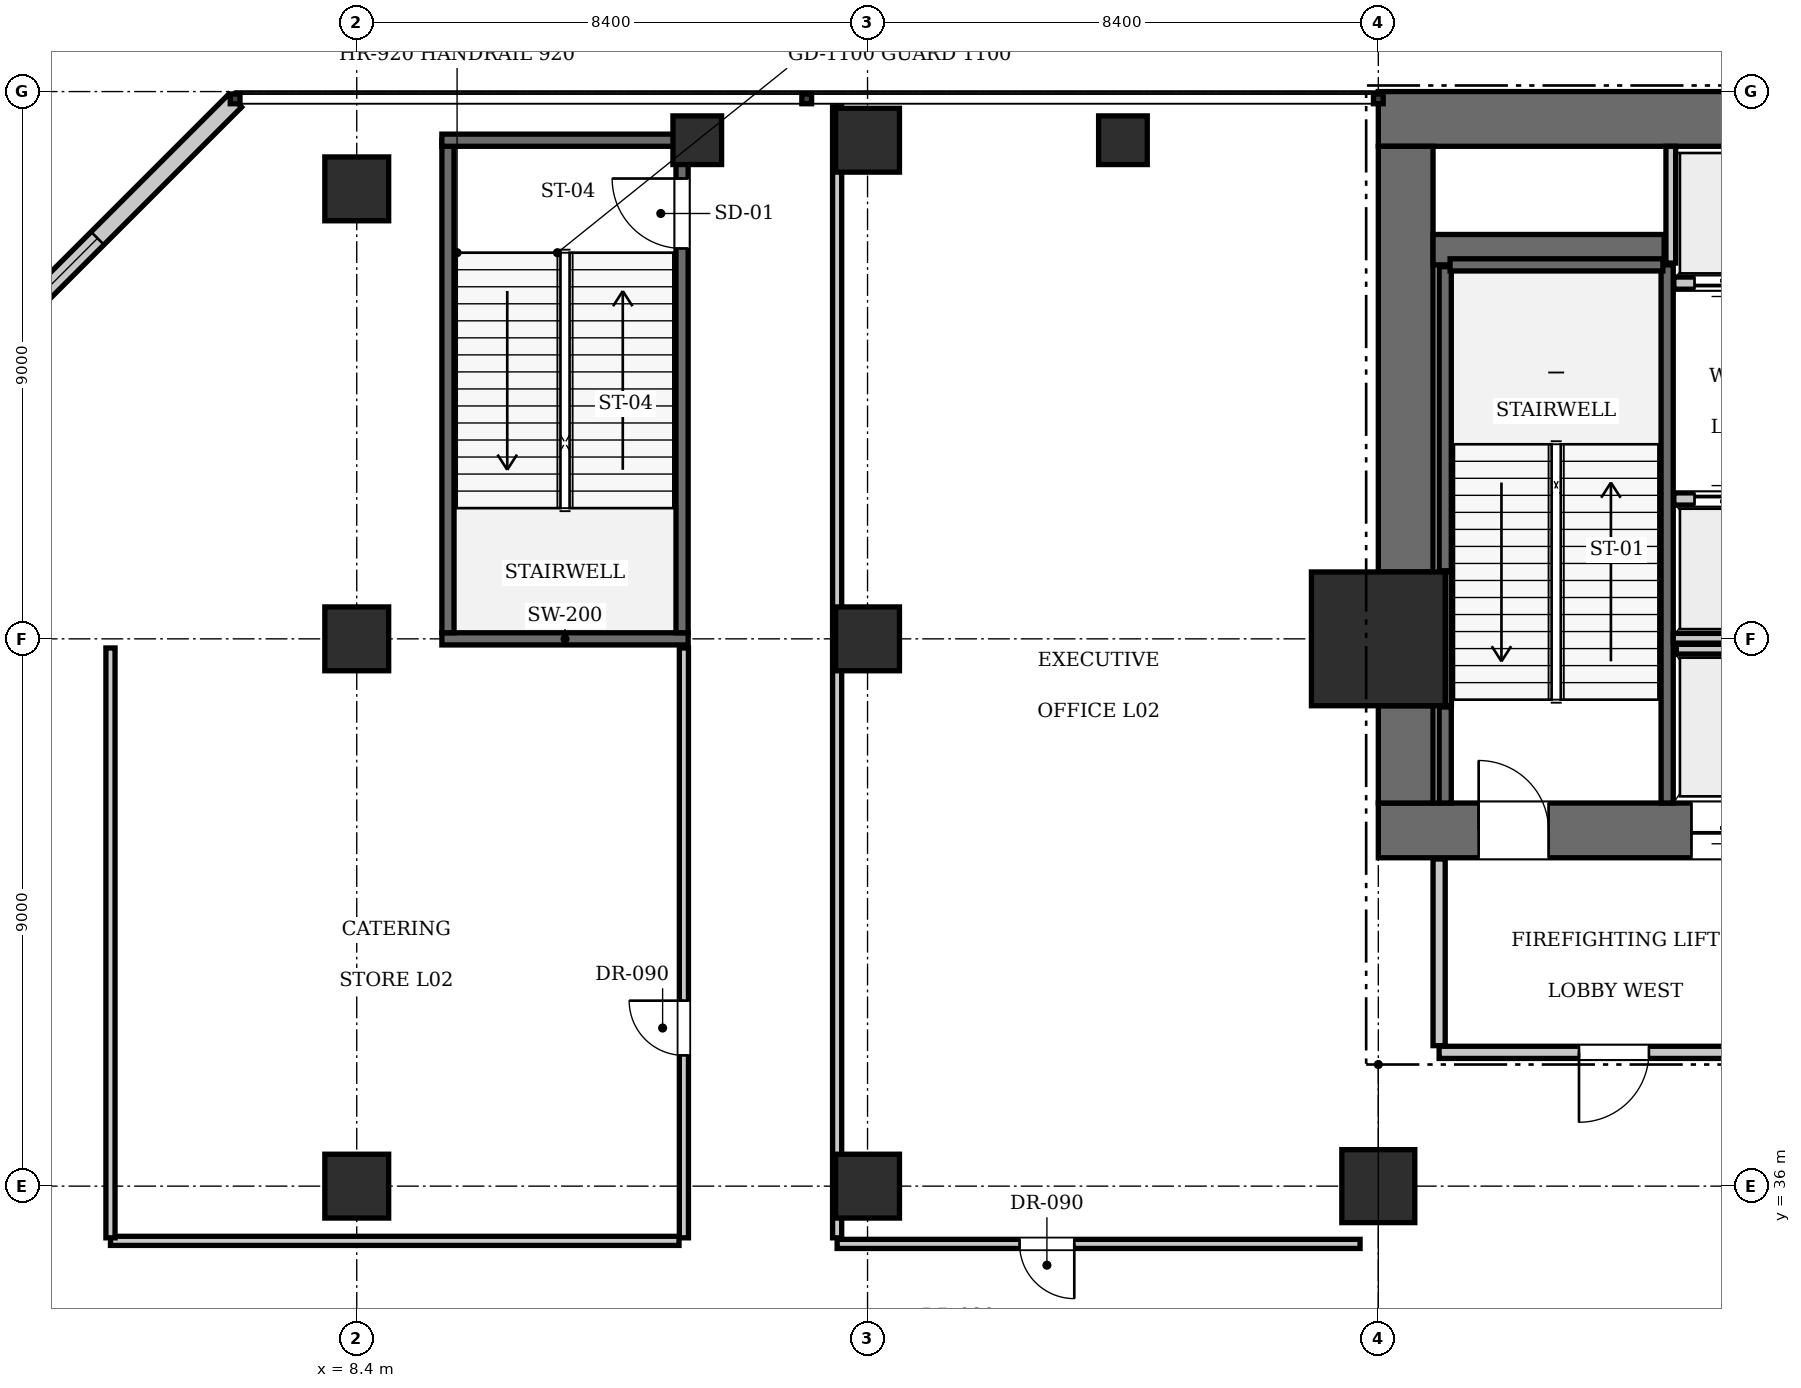
"""IFC4 building model, lengths in metres.
Left out: names, types, materials, properties, quantities, classifications, styles, units other than length and angle.
Written with IfcOpenShell. Run it as: python <this file> out.ifc"""

import sys

from ifc_helpers import new_model, si_unit, direction, frame, frame_2d, origin, origin_2d, place, context, subcontext, project, spatial, rectangle, extrude, element, fill, save


model = new_model("IFC4")
c1 = context("Model", 3, precision=1e-05, world=origin(), true_north=direction((0.0, 1.0)))
c2 = subcontext(c1, "Body", "Model", "MODEL_VIEW")
j1 = project(units=[si_unit("LENGTHUNIT", "METRE"), si_unit("PLANEANGLEUNIT", "RADIAN")], contexts=[c1])
p1 = place(None, origin())
s1 = spatial("IfcSite", under=j1, at=p1, CompositionType="ELEMENT")
p2 = place(p1, origin())
s2 = spatial("IfcBuilding", under=s1, at=p2, CompositionType="ELEMENT")
p3 = place(p2, frame((0.0, 0.0, 10.85)))
s3 = spatial("IfcBuildingStorey", under=s2, at=p3, CompositionType="ELEMENT", Elevation=10.85)
p4 = place(p3, frame((25.2, 45.0, 0.0), z_axis=(0.0, 0.0, 1.0), x_axis=(1.0, 0.0, 0.0)))
e1 = element("IfcColumn", 1, at=p4, inside=s3, PredefinedType="COLUMN", context=c2, shape_type="SweptSolid", body=[
    extrude(rectangle(XDim=2.2, YDim=2.2, at=origin_2d()), origin(), (0.0, 0.0, 1.0), 5.6),
])
p5 = place(p3, frame((25.2, 53.55, 0.0), z_axis=(0.0, 0.0, 1.0), x_axis=(1.0, 0.0, 0.0)))
e2 = element("IfcWall", 2, at=p5, inside=s3, PredefinedType="SHEAR", context=c2, shape_type="SweptSolid", body=[
    extrude(rectangle(XDim=25.2, YDim=0.9, at=frame_2d((12.6, 0.0))), origin(), (0.0, 0.0, 1.0), 5.6),
])
p6 = place(p3, frame((25.2, 41.85, 0.0), z_axis=(0.0, 0.0, 1.0), x_axis=(1.0, 0.0, 0.0)))
e3 = element("IfcWall", 3, at=p6, inside=s3, PredefinedType="SHEAR", context=c2, shape_type="SweptSolid", body=[
    extrude(rectangle(XDim=6.8, YDim=0.9, at=frame_2d((3.4, 0.0))), origin(), (0.0, 0.0, 1.0), 5.6),
])
p7 = place(p6, frame((1.65, 0.0, 0.0)))
e4 = element("IfcOpeningElement", 4, at=p7, cuts=e3, PredefinedType="OPENING", context=c2, shape_type="SweptSolid", body=[
    extrude(rectangle(XDim=1.15, YDim=2.15, at=frame_2d((0.575, 1.075))), frame((0.0, 0.46, 0.0), z_axis=(0.0, -1.0, 0.0), x_axis=(1.0, 0.0, 0.0)), (0.0, 0.0, 1.0), 0.92),
])
p8 = place(p6, frame((5.15, 0.0, 0.0)))
e5 = element("IfcOpeningElement", 5, at=p8, cuts=e3, PredefinedType="OPENING", context=c2, shape_type="SweptSolid", body=[
    extrude(rectangle(XDim=1.1, YDim=2.2, at=frame_2d((0.55, 1.1))), frame((0.0, 0.46, 0.0), z_axis=(0.0, -1.0, 0.0), x_axis=(1.0, 0.0, 0.0)), (0.0, 0.0, 1.0), 0.92),
])
p9 = place(p3, frame((25.65, 42.3, 0.0), z_axis=(0.0, 0.0, 1.0), x_axis=(0.0, 1.0, 0.0)))
e6 = element("IfcWall", 6, at=p9, inside=s3, PredefinedType="SHEAR", context=c2, shape_type="SweptSolid", body=[
    extrude(rectangle(XDim=1.6, YDim=0.9, at=frame_2d((0.8, 0.0))), origin(), (0.0, 0.0, 1.0), 5.6),
])
p10 = place(p3, frame((25.65, 46.1, 0.0), z_axis=(0.0, 0.0, 1.0), x_axis=(0.0, 1.0, 0.0)))
e7 = element("IfcWall", 7, at=p10, inside=s3, PredefinedType="SHEAR", context=c2, shape_type="SweptSolid", body=[
    extrude(rectangle(XDim=7.0, YDim=0.9, at=frame_2d((3.5, 0.0))), origin(), (0.0, 0.0, 1.0), 5.6),
])
p11 = place(p3, frame((26.1, 51.4, 0.0), z_axis=(0.0, 0.0, 1.0), x_axis=(1.0, 0.0, 0.0)))
e8 = element("IfcWall", 8, at=p11, inside=s3, PredefinedType="SHEAR", context=c2, shape_type="SweptSolid", body=[
    extrude(rectangle(XDim=3.8, YDim=0.5, at=frame_2d((1.9, 0.0))), origin(), (0.0, 0.0, 1.0), 5.6),
])
p12 = place(p3, frame((25.2, 36.0, 0.0), z_axis=(0.0, 0.0, 1.0), x_axis=(1.0, 0.0, 0.0)))
e9 = element("IfcColumn", 9, at=p12, inside=s3, PredefinedType="COLUMN", context=c2, shape_type="SweptSolid", body=[
    extrude(rectangle(XDim=1.2, YDim=1.2, at=origin_2d()), origin(), (0.0, 0.0, 1.0), 5.6),
])
for number, where, z_axis, x_axis in (
    (10, (16.8, 36.0, 0.0), (0.0, 0.0, 1.0), (1.0, 0.0, 0.0)),
    (11, (16.8, 45.0, 0.0), (0.0, 0.0, 1.0), (1.0, 0.0, 0.0)),
    (12, (8.4, 36.0, 0.0), (0.0, 0.0, 1.0), (1.0, 0.0, 0.0)),
    (13, (8.4, 45.0, 0.0), (0.0, 0.0, 1.0), (1.0, 0.0, 0.0)),
    (14, (8.4, 52.4, 0.0), (0.0, 0.0, 1.0), (1.0, 0.0, 0.0)),
    (15, (16.8, 53.2, 0.0), (0.0, 0.0, 1.0), (1.0, 0.0, 0.0)),
):
    element("IfcColumn", number, at=place(p3, frame(where, z_axis=z_axis, x_axis=x_axis)), inside=s3, PredefinedType="COLUMN", context=c2, shape_type="SweptSolid", body=[
        extrude(rectangle(XDim=1.05, YDim=1.05, at=origin_2d()), origin(), (0.0, 0.0, 1.0), 5.6),
    ])
for number, where, z_axis, x_axis in (
    (16, (14.0, 53.2, 0.0), (0.0, 0.0, 1.0), (1.0, 0.0, 0.0)),
    (17, (21.0, 53.2, 0.0), (0.0, 0.0, 1.0), (1.0, 0.0, 0.0)),
):
    element("IfcColumn", number, at=place(p3, frame(where, z_axis=z_axis, x_axis=x_axis)), inside=s3, PredefinedType="PILASTER", context=c2, shape_type="SweptSolid", body=[
        extrude(rectangle(XDim=0.8, YDim=0.8, at=origin_2d()), origin(), (0.0, 0.0, 1.0), 5.6),
    ])
p13 = place(p3, frame((29.95, 42.3, 0.0), z_axis=(0.0, 0.0, 1.0), x_axis=(0.0, 1.0, 0.0)))
e18 = element("IfcWall", 18, at=p13, inside=s3, PredefinedType="SOLIDWALL", context=c2, shape_type="SweptSolid", body=[
    extrude(rectangle(XDim=8.85, YDim=0.2, at=frame_2d((4.425, 0.0))), origin(), (0.0, 0.0, 1.0), 5.32),
])
p14 = place(p3, frame((26.3, 42.3, 0.0), z_axis=(0.0, 0.0, 1.0), x_axis=(0.0, 1.0, 0.0)))
e19 = element("IfcWall", 19, at=p14, inside=s3, PredefinedType="SOLIDWALL", context=c2, shape_type="SweptSolid", body=[
    extrude(rectangle(XDim=1.58, YDim=0.2, at=frame_2d((0.79, 0.0))), origin(), (0.0, 0.0, 1.0), 5.32),
])
p15 = place(p3, frame((26.3, 46.12, 0.0), z_axis=(0.0, 0.0, 1.0), x_axis=(0.0, 1.0, 0.0)))
e20 = element("IfcWall", 20, at=p15, inside=s3, PredefinedType="SOLIDWALL", context=c2, shape_type="SweptSolid", body=[
    extrude(rectangle(XDim=5.0, YDim=0.2, at=frame_2d((2.5, 0.0))), origin(), (0.0, 0.0, 1.0), 5.32),
])
p16 = place(p3, frame((26.38, 51.15, 0.0), z_axis=(0.0, 0.0, 1.0), x_axis=(1.0, 0.0, 0.0)))
e21 = element("IfcWall", 21, at=p16, inside=s3, PredefinedType="SOLIDWALL", context=c2, shape_type="SweptSolid", body=[
    extrude(rectangle(XDim=3.5, YDim=0.2, at=frame_2d((1.75, 0.0))), origin(), (0.0, 0.0, 1.0), 5.32),
])
p17 = place(p3, frame((26.352, 43.9, 0.0), z_axis=(0.0, 0.0, 1.0), x_axis=(0.0, 1.0, 0.0)))
e22 = element("IfcWall", 22, at=p17, inside=s3, PredefinedType="SOLIDWALL", context=c2, shape_type="SweptSolid", body=[
    extrude(rectangle(XDim=2.2, YDim=0.1, at=frame_2d((1.1, 0.0))), origin(), (0.0, 0.0, 1.0), 5.32),
])
p18 = place(p3, frame((9.8, 45.0, 0.0), z_axis=(0.0, 0.0, 1.0), x_axis=(1.0, 0.0, 0.0)))
e23 = element("IfcWall", 23, at=p18, inside=s3, PredefinedType="SOLIDWALL", context=c2, shape_type="SweptSolid", body=[
    extrude(rectangle(XDim=4.05, YDim=0.2, at=frame_2d((2.025, 0.0))), origin(), (0.0, 0.0, 1.0), 4.685),
])
p19 = place(p3, frame((9.9, 45.1, 0.0), z_axis=(0.0, 0.0, 1.0), x_axis=(0.0, 1.0, 0.0)))
e24 = element("IfcWall", 24, at=p19, inside=s3, PredefinedType="SOLIDWALL", context=c2, shape_type="SweptSolid", body=[
    extrude(rectangle(XDim=8.1, YDim=0.2, at=frame_2d((4.05, 0.0))), origin(), (0.0, 0.0, 1.0), 5.32),
])
p20 = place(p3, frame((13.75, 45.1, 0.0), z_axis=(0.0, 0.0, 1.0), x_axis=(0.0, 1.0, 0.0)))
e25 = element("IfcWall", 25, at=p20, inside=s3, PredefinedType="SOLIDWALL", context=c2, shape_type="SweptSolid", body=[
    extrude(rectangle(XDim=8.1, YDim=0.2, at=frame_2d((4.05, 0.0))), origin(), (0.0, 0.0, 1.0), 5.32),
])
p21 = place(p20, frame((6.32, 0.0, 0.0)))
e26 = element("IfcOpeningElement", 26, at=p21, cuts=e25, PredefinedType="OPENING", context=c2, shape_type="SweptSolid", body=[
    extrude(rectangle(XDim=1.15, YDim=2.15, at=frame_2d((0.575, 1.075))), frame((0.0, 0.11, 0.0), z_axis=(0.0, -1.0, 0.0), x_axis=(1.0, 0.0, 0.0)), (0.0, 0.0, 1.0), 0.22),
])
p22 = place(p3, frame((9.8, 53.2, 0.0), z_axis=(0.0, 0.0, 1.0), x_axis=(1.0, 0.0, 0.0)))
e27 = element("IfcWall", 27, at=p22, inside=s3, PredefinedType="SOLIDWALL", context=c2, shape_type="SweptSolid", body=[
    extrude(rectangle(XDim=4.05, YDim=0.2, at=frame_2d((2.025, 0.0))), origin(), (0.0, 0.0, 1.0), 5.32),
])
p23 = place(p3, frame((30.06, 47.3, 0.0), z_axis=(0.0, 0.0, 1.0), x_axis=(1.0, 0.0, 0.0)))
e28 = element("IfcWall", 28, at=p23, inside=s3, PredefinedType="SOLIDWALL", context=c2, shape_type="SweptSolid", body=[
    extrude(rectangle(XDim=1.68, YDim=0.2, at=frame_2d((0.84, 0.0))), origin(), (0.0, 0.0, 1.0), 5.32),
])
p24 = place(p23, frame((0.34, 0.0, 0.0)))
e29 = element("IfcOpeningElement", 29, at=p24, cuts=e28, PredefinedType="OPENING", context=c2, shape_type="SweptSolid", body=[
    extrude(rectangle(XDim=1.0, YDim=2.15, at=frame_2d((0.5, 1.075))), frame((0.0, 0.11, 0.0), z_axis=(0.0, -1.0, 0.0), x_axis=(1.0, 0.0, 0.0)), (0.0, 0.0, 1.0), 0.22),
])
p25 = place(p3, frame((30.06, 50.85, 0.0), z_axis=(0.0, 0.0, 1.0), x_axis=(1.0, 0.0, 0.0)))
e30 = element("IfcWall", 30, at=p25, inside=s3, PredefinedType="SOLIDWALL", context=c2, shape_type="SweptSolid", body=[
    extrude(rectangle(XDim=1.68, YDim=0.2, at=frame_2d((0.84, 0.0))), origin(), (0.0, 0.0, 1.0), 5.32),
])
p26 = place(p25, frame((0.34, 0.0, 0.0)))
e31 = element("IfcOpeningElement", 31, at=p26, cuts=e30, PredefinedType="OPENING", context=c2, shape_type="SweptSolid", body=[
    extrude(rectangle(XDim=1.0, YDim=2.15, at=frame_2d((0.5, 1.075))), frame((0.0, 0.11, 0.0), z_axis=(0.0, -1.0, 0.0), x_axis=(1.0, 0.0, 0.0)), (0.0, 0.0, 1.0), 0.22),
])
p27 = place(p3, frame((30.1, 44.83, 0.0), z_axis=(0.0, 0.0, 1.0), x_axis=(1.0, 0.0, 0.0)))
e32 = element("IfcWall", 32, at=p27, inside=s3, PredefinedType="SOLIDWALL", context=c2, shape_type="SweptSolid", body=[
    extrude(rectangle(XDim=1.6, YDim=0.16, at=frame_2d((0.8, 0.0))), origin(), (0.0, 0.0, 1.0), 5.32),
])
p28 = place(p3, frame((30.05, 45.01, 0.0), z_axis=(0.0, 0.0, 1.0), x_axis=(1.0, 0.0, 0.0)))
e33 = element("IfcWall", 33, at=p28, inside=s3, PredefinedType="SOLIDWALL", context=c2, shape_type="SweptSolid", body=[
    extrude(rectangle(XDim=3.45, YDim=0.16, at=frame_2d((1.725, 0.0))), origin(), (0.0, 0.0, 1.0), 5.32),
])
p29 = place(p3, frame((30.01, 51.18, 0.0), z_axis=(0.0, 0.0, 1.0), x_axis=(0.0, 1.0, 0.0)))
e34 = element("IfcWall", 34, at=p29, inside=s3, PredefinedType="SOLIDWALL", context=c2, shape_type="SweptSolid", body=[
    extrude(rectangle(XDim=1.92, YDim=0.16, at=frame_2d((0.96, 0.0))), origin(), (0.0, 0.0, 1.0), 5.32),
])
p30 = place(p3, frame((6.4, 53.85, 0.0), z_axis=(0.0, 0.0, 1.0), x_axis=(-0.707106781187, -0.707106781187, 0.0)))
e35 = element("IfcWall", 35, at=p30, inside=s3, PredefinedType="SOLIDWALL", context=c2, shape_type="SweptSolid", body=[
    extrude(rectangle(XDim=8.839, YDim=0.3, at=frame_2d((4.419, 0.0))), origin(), (0.0, 0.0, 1.0), 5.32),
])
p31 = place(p30, frame((3.2, 0.0, 0.9)))
e36 = element("IfcOpeningElement", 36, at=p31, cuts=e35, PredefinedType="OPENING", context=c2, shape_type="SweptSolid", body=[
    extrude(rectangle(XDim=2.4, YDim=2.6, at=frame_2d((1.2, 1.3))), frame((0.0, 0.16, 0.0), z_axis=(0.0, -1.0, 0.0), x_axis=(1.0, 0.0, 0.0)), (0.0, 0.0, 1.0), 0.32),
])
p32 = place(p3, frame((26.2, 38.2, 0.0), z_axis=(0.0, 0.0, 1.0), x_axis=(1.0, 0.0, 0.0)))
e37 = element("IfcWall", 37, at=p32, inside=s3, PredefinedType="PARTITIONING", context=c2, shape_type="SweptSolid", body=[
    extrude(rectangle(XDim=5.8, YDim=0.2, at=frame_2d((2.9, 0.0))), origin(), (0.0, 0.0, 1.0), 5.32),
])
p33 = place(p32, frame((2.3, 0.0, 0.0)))
e38 = element("IfcOpeningElement", 38, at=p33, cuts=e37, PredefinedType="OPENING", context=c2, shape_type="SweptSolid", body=[
    extrude(rectangle(XDim=1.15, YDim=2.15, at=frame_2d((0.575, 1.075))), frame((0.0, 0.11, 0.0), z_axis=(0.0, -1.0, 0.0), x_axis=(1.0, 0.0, 0.0)), (0.0, 0.0, 1.0), 0.22),
])
p34 = place(p3, frame((26.2, 38.31, 0.0), z_axis=(0.0, 0.0, 1.0), x_axis=(0.0, 1.0, 0.0)))
e39 = element("IfcWall", 39, at=p34, inside=s3, PredefinedType="PARTITIONING", context=c2, shape_type="SweptSolid", body=[
    extrude(rectangle(XDim=3.07, YDim=0.2, at=frame_2d((1.535, 0.0))), origin(), (0.0, 0.0, 1.0), 5.32),
])
p35 = place(p3, frame((16.3, 35.05, 0.0), z_axis=(0.0, 0.0, 1.0), x_axis=(1.0, 0.0, 0.0)))
e40 = element("IfcWall", 40, at=p35, inside=s3, PredefinedType="PARTITIONING", context=c2, shape_type="SweptSolid", body=[
    extrude(rectangle(XDim=8.6, YDim=0.15, at=frame_2d((4.3, 0.0))), origin(), (0.0, 0.0, 1.0), 5.32),
])
p36 = place(p35, frame((3.0, 0.0, 0.0)))
e41 = element("IfcOpeningElement", 41, at=p36, cuts=e40, PredefinedType="OPENING", context=c2, shape_type="SweptSolid", body=[
    extrude(rectangle(XDim=0.9, YDim=2.1, at=frame_2d((0.45, 1.05))), frame((0.0, 0.085, 0.0), z_axis=(0.0, -1.0, 0.0), x_axis=(1.0, 0.0, 0.0)), (0.0, 0.0, 1.0), 0.17),
])
p37 = place(p3, frame((16.3, 35.15, 0.0), z_axis=(0.0, 0.0, 1.0), x_axis=(0.0, 1.0, 0.0)))
e42 = element("IfcWall", 42, at=p37, inside=s3, PredefinedType="PARTITIONING", context=c2, shape_type="SweptSolid", body=[
    extrude(rectangle(XDim=18.6, YDim=0.15, at=frame_2d((9.3, 0.0))), origin(), (0.0, 0.0, 1.0), 5.32),
])
p38 = place(p3, frame((13.78, 35.15, 0.0), z_axis=(0.0, 0.0, 1.0), x_axis=(0.0, 1.0, 0.0)))
e43 = element("IfcWall", 43, at=p38, inside=s3, PredefinedType="PARTITIONING", context=c2, shape_type="SweptSolid", body=[
    extrude(rectangle(XDim=9.7, YDim=0.15, at=frame_2d((4.85, 0.0))), origin(), (0.0, 0.0, 1.0), 5.32),
])
p39 = place(p38, frame((3.0, 0.0, 0.0)))
e44 = element("IfcOpeningElement", 44, at=p39, cuts=e43, PredefinedType="OPENING", context=c2, shape_type="SweptSolid", body=[
    extrude(rectangle(XDim=0.9, YDim=2.1, at=frame_2d((0.45, 1.05))), frame((0.0, 0.085, 0.0), z_axis=(0.0, -1.0, 0.0), x_axis=(1.0, 0.0, 0.0)), (0.0, 0.0, 1.0), 0.17),
])
p40 = place(p3, frame((4.35, 35.1, 0.0), z_axis=(0.0, 0.0, 1.0), x_axis=(1.0, 0.0, 0.0)))
e45 = element("IfcWall", 45, at=p40, inside=s3, PredefinedType="PARTITIONING", context=c2, shape_type="SweptSolid", body=[
    extrude(rectangle(XDim=9.35, YDim=0.15, at=frame_2d((4.675, 0.0))), origin(), (0.0, 0.0, 1.0), 5.32),
])
p41 = place(p3, frame((4.35, 35.15, 0.0), z_axis=(0.0, 0.0, 1.0), x_axis=(0.0, 1.0, 0.0)))
e46 = element("IfcWall", 46, at=p41, inside=s3, PredefinedType="PARTITIONING", context=c2, shape_type="SweptSolid", body=[
    extrude(rectangle(XDim=9.7, YDim=0.15, at=frame_2d((4.85, 0.0))), origin(), (0.0, 0.0, 1.0), 5.32),
])
p42 = place(p7, origin())
e47 = element("IfcDoor", 47, at=p42, inside=s3, OperationType="SINGLE_SWING_LEFT", PredefinedType="DOOR", context=c2, shape_type="SweptSolid", body=[
    extrude(rectangle(XDim=1.15, YDim=2.15, at=frame_2d((0.575, 1.075))), frame((0.0, 0.025, 0.0), z_axis=(0.0, -1.0, 0.0), x_axis=(1.0, 0.0, 0.0)), (0.0, 0.0, 1.0), 0.05),
])
fill(e4, e47)
p43 = place(p21, origin())
e48 = element("IfcDoor", 48, at=p43, inside=s3, OperationType="SINGLE_SWING_RIGHT", PredefinedType="DOOR", context=c2, shape_type="SweptSolid", body=[
    extrude(rectangle(XDim=1.15, YDim=2.15, at=frame_2d((0.575, 1.075))), frame((0.0, 0.025, 0.0), z_axis=(0.0, -1.0, 0.0), x_axis=(1.0, 0.0, 0.0)), (0.0, 0.0, 1.0), 0.05),
])
fill(e26, e48)
p44 = place(p24, origin())
e49 = element("IfcDoor", 49, at=p44, inside=s3, OperationType="SLIDING_TO_LEFT", PredefinedType="DOOR", context=c2, shape_type="SweptSolid", body=[
    extrude(rectangle(XDim=1.0, YDim=2.15, at=frame_2d((0.5, 1.075))), frame((0.0, 0.025, 0.0), z_axis=(0.0, -1.0, 0.0), x_axis=(1.0, 0.0, 0.0)), (0.0, 0.0, 1.0), 0.05),
])
fill(e29, e49)
p45 = place(p26, frame((1.0, 0.0, 0.0), z_axis=(0.0, 0.0, 1.0), x_axis=(-1.0, 0.0, 0.0)))
e50 = element("IfcDoor", 50, at=p45, inside=s3, OperationType="SLIDING_TO_LEFT", PredefinedType="DOOR", context=c2, shape_type="SweptSolid", body=[
    extrude(rectangle(XDim=1.0, YDim=2.15, at=frame_2d((0.5, 1.075))), frame((0.0, 0.025, 0.0), z_axis=(0.0, -1.0, 0.0), x_axis=(1.0, 0.0, 0.0)), (0.0, 0.0, 1.0), 0.05),
])
fill(e31, e50)
p46 = place(p8, frame((1.1, 0.0, 0.0), z_axis=(0.0, 0.0, 1.0), x_axis=(-1.0, 0.0, 0.0)))
e51 = element("IfcDoor", 51, at=p46, inside=s3, OperationType="SLIDING_TO_LEFT", PredefinedType="DOOR", context=c2, shape_type="SweptSolid", body=[
    extrude(rectangle(XDim=1.1, YDim=2.2, at=frame_2d((0.55, 1.1))), frame((0.0, 0.025, 0.0), z_axis=(0.0, -1.0, 0.0), x_axis=(1.0, 0.0, 0.0)), (0.0, 0.0, 1.0), 0.05),
])
fill(e5, e51)
p47 = place(p31, origin())
e52 = element("IfcWindow", 52, at=p47, inside=s3, PartitioningType="SINGLE_PANEL", PredefinedType="WINDOW", context=c2, shape_type="SweptSolid", body=[
    extrude(rectangle(XDim=2.4, YDim=2.6, at=frame_2d((1.2, 1.3))), frame((0.0, 0.03, 0.0), z_axis=(0.0, -1.0, 0.0), x_axis=(1.0, 0.0, 0.0)), (0.0, 0.0, 1.0), 0.06),
])
fill(e36, e52)
p48 = place(p33, frame((1.15, 0.0, 0.0), z_axis=(0.0, 0.0, 1.0), x_axis=(-1.0, 0.0, 0.0)))
e53 = element("IfcDoor", 53, at=p48, inside=s3, OperationType="SINGLE_SWING_RIGHT", PredefinedType="DOOR", context=c2, shape_type="SweptSolid", body=[
    extrude(rectangle(XDim=1.15, YDim=2.15, at=frame_2d((0.575, 1.075))), frame((0.0, 0.025, 0.0), z_axis=(0.0, -1.0, 0.0), x_axis=(1.0, 0.0, 0.0)), (0.0, 0.0, 1.0), 0.05),
])
fill(e38, e53)
p49 = place(p36, frame((0.9, 0.0, 0.0), z_axis=(0.0, 0.0, 1.0), x_axis=(-1.0, 0.0, 0.0)))
e54 = element("IfcDoor", 54, at=p49, inside=s3, OperationType="SINGLE_SWING_LEFT", PredefinedType="DOOR", context=c2, shape_type="SweptSolid", body=[
    extrude(rectangle(XDim=0.9, YDim=2.1, at=frame_2d((0.45, 1.05))), frame((0.0, 0.025, 0.0), z_axis=(0.0, -1.0, 0.0), x_axis=(1.0, 0.0, 0.0)), (0.0, 0.0, 1.0), 0.05),
])
fill(e41, e54)
p50 = place(p39, origin())
e55 = element("IfcDoor", 55, at=p50, inside=s3, OperationType="SINGLE_SWING_RIGHT", PredefinedType="DOOR", context=c2, shape_type="SweptSolid", body=[
    extrude(rectangle(XDim=0.9, YDim=2.1, at=frame_2d((0.45, 1.05))), frame((0.0, 0.025, 0.0), z_axis=(0.0, -1.0, 0.0), x_axis=(1.0, 0.0, 0.0)), (0.0, 0.0, 1.0), 0.05),
])
fill(e44, e55)
save(model, sys.argv[1])
